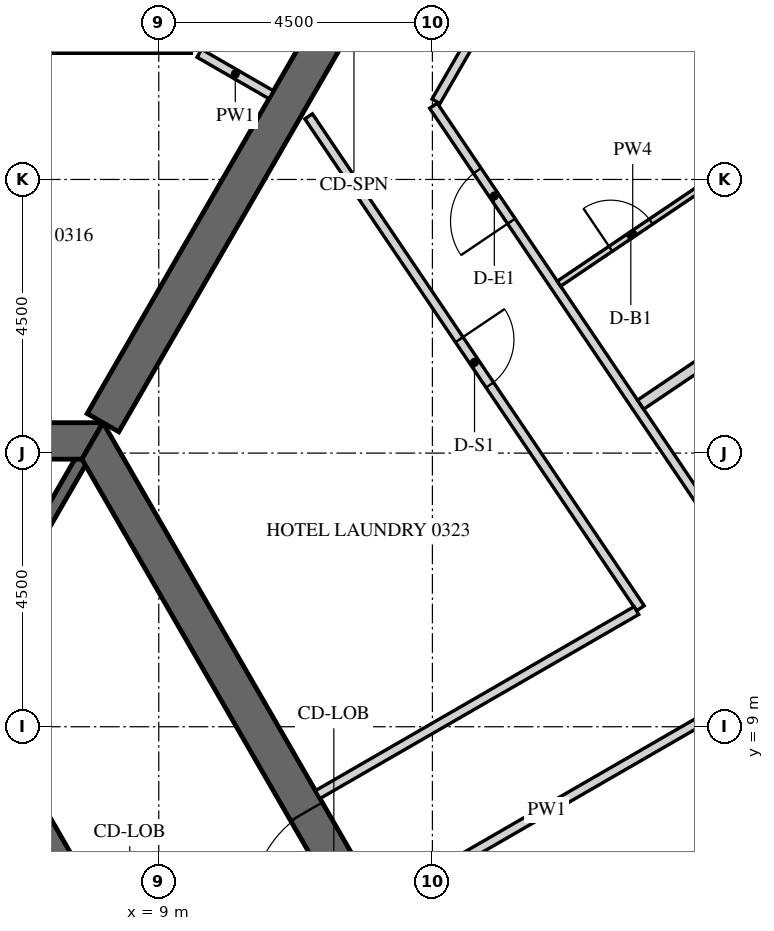
"""IFC4 building model, lengths in metres.
Left out: names, types, materials, properties, quantities, classifications, styles, units other than length and angle.
Written with IfcOpenShell. Run it as: python <this file> out.ifc"""

import sys

from ifc_helpers import new_model, si_unit, direction, frame, frame_2d, origin, place, context, subcontext, project, spatial, polyline, rectangle, outline, extrude, element, fill, save


model = new_model("IFC4")
c1 = context("Model", 3, precision=1e-05, world=origin(), true_north=direction((0.0, 1.0)))
c2 = subcontext(c1, "Body", "Model", "MODEL_VIEW")
j1 = project(units=[si_unit("LENGTHUNIT", "METRE"), si_unit("PLANEANGLEUNIT", "RADIAN")], contexts=[c1])
p1 = place(None, origin())
s1 = spatial("IfcSite", under=j1, at=p1, CompositionType="ELEMENT")
p2 = place(p1, origin())
s2 = spatial("IfcBuilding", under=s1, at=p2, CompositionType="ELEMENT")
p3 = place(p2, frame((0.0, 0.0, 60.9)))
s3 = spatial("IfcBuildingStorey", under=s2, at=p3, CompositionType="ELEMENT", Elevation=60.9)
p4 = place(p3, frame((33.728, 3.153, -0.15), z_axis=(0.0, 0.0, 1.0), x_axis=(-0.559192411416, 0.82903790445, 0.0)))
e1 = element("IfcWall", 1, at=p4, inside=s3, PredefinedType="SOLIDWALL", context=c2, shape_type="SweptSolid", body=[
    extrude(outline(polyline([(-0.026, -0.275), (30.093, -0.275), (30.048, 0.275), (0.026, 0.275), (-0.026, -0.275)])), origin(), (0.0, 0.0, 1.0), 3.9),
])
p5 = place(p4, frame((1.236, 0.0, 1.05)))
e2 = element("IfcOpeningElement", 2, at=p5, cuts=e1, PredefinedType="OPENING", context=c2, shape_type="SweptSolid", body=[
    extrude(rectangle(XDim=2.4, YDim=2.4, at=frame_2d((1.2, 1.2))), frame((0.0, 0.285, 0.0), z_axis=(0.0, -1.0, 0.0), x_axis=(1.0, 0.0, 0.0)), (0.0, 0.0, 1.0), 0.57),
])
p6 = place(p4, frame((4.835, 0.0, 1.05)))
e3 = element("IfcOpeningElement", 3, at=p6, cuts=e1, PredefinedType="OPENING", context=c2, shape_type="SweptSolid", body=[
    extrude(rectangle(XDim=2.4, YDim=2.4, at=frame_2d((1.2, 1.2))), frame((0.0, 0.285, 0.0), z_axis=(0.0, -1.0, 0.0), x_axis=(1.0, 0.0, 0.0)), (0.0, 0.0, 1.0), 0.57),
])
p7 = place(p4, frame((8.436, 0.0, 1.05)))
e4 = element("IfcOpeningElement", 4, at=p7, cuts=e1, PredefinedType="OPENING", context=c2, shape_type="SweptSolid", body=[
    extrude(rectangle(XDim=2.4, YDim=2.4, at=frame_2d((1.2, 1.2))), frame((0.0, 0.285, 0.0), z_axis=(0.0, -1.0, 0.0), x_axis=(1.0, 0.0, 0.0)), (0.0, 0.0, 1.0), 0.57),
])
p8 = place(p4, frame((12.035, 0.0, 1.05)))
e5 = element("IfcOpeningElement", 5, at=p8, cuts=e1, PredefinedType="OPENING", context=c2, shape_type="SweptSolid", body=[
    extrude(rectangle(XDim=2.4, YDim=2.4, at=frame_2d((1.2, 1.2))), frame((0.0, 0.285, 0.0), z_axis=(0.0, -1.0, 0.0), x_axis=(1.0, 0.0, 0.0)), (0.0, 0.0, 1.0), 0.57),
])
p9 = place(p4, frame((15.635, 0.0, 1.05)))
e6 = element("IfcOpeningElement", 6, at=p9, cuts=e1, PredefinedType="OPENING", context=c2, shape_type="SweptSolid", body=[
    extrude(rectangle(XDim=2.4, YDim=2.4, at=frame_2d((1.2, 1.2))), frame((0.0, 0.285, 0.0), z_axis=(0.0, -1.0, 0.0), x_axis=(1.0, 0.0, 0.0)), (0.0, 0.0, 1.0), 0.57),
])
p10 = place(p4, frame((19.236, 0.0, 1.05)))
e7 = element("IfcOpeningElement", 7, at=p10, cuts=e1, PredefinedType="OPENING", context=c2, shape_type="SweptSolid", body=[
    extrude(rectangle(XDim=2.4, YDim=2.4, at=frame_2d((1.2, 1.2))), frame((0.0, 0.285, 0.0), z_axis=(0.0, -1.0, 0.0), x_axis=(1.0, 0.0, 0.0)), (0.0, 0.0, 1.0), 0.57),
])
p11 = place(p4, frame((22.835, 0.0, 1.05)))
e8 = element("IfcOpeningElement", 8, at=p11, cuts=e1, PredefinedType="OPENING", context=c2, shape_type="SweptSolid", body=[
    extrude(rectangle(XDim=2.4, YDim=2.4, at=frame_2d((1.2, 1.2))), frame((0.0, 0.285, 0.0), z_axis=(0.0, -1.0, 0.0), x_axis=(1.0, 0.0, 0.0)), (0.0, 0.0, 1.0), 0.57),
])
p12 = place(p4, frame((26.436, 0.0, 1.05)))
e9 = element("IfcOpeningElement", 9, at=p12, cuts=e1, PredefinedType="OPENING", context=c2, shape_type="SweptSolid", body=[
    extrude(rectangle(XDim=2.4, YDim=2.4, at=frame_2d((1.2, 1.2))), frame((0.0, 0.285, 0.0), z_axis=(0.0, -1.0, 0.0), x_axis=(1.0, 0.0, 0.0)), (0.0, 0.0, 1.0), 0.57),
])
p13 = place(p3, frame((15.819, 0.0, -0.15), z_axis=(0.0, 0.0, 1.0), x_axis=(-0.499999880136, 0.866025472988, 0.0)))
e10 = element("IfcWall", 10, at=p13, inside=s3, PredefinedType="SHEAR", context=c2, shape_type="SweptSolid", body=[
    extrude(outline(polyline([(-0.173, -0.3), (15.993, -0.3), (15.646, 0.3), (0.173, 0.3), (-0.173, -0.3)])), origin(), (0.0, 0.0, 1.0), 3.9),
])
p14 = place(p13, frame((6.981, 0.0, 0.15)))
e11 = element("IfcOpeningElement", 11, at=p14, cuts=e10, PredefinedType="OPENING", context=c2, shape_type="SweptSolid", body=[
    extrude(rectangle(XDim=1.8, YDim=2.4, at=frame_2d((0.9, 1.2))), frame((0.0, 0.31, 0.0), z_axis=(0.0, -1.0, 0.0), x_axis=(1.0, 0.0, 0.0)), (0.0, 0.0, 1.0), 0.62),
])
p15 = place(p3, frame((7.91, 13.7, -0.15), z_axis=(0.0, 0.0, 1.0), x_axis=(-1.0, 0.0, 0.0)))
e12 = element("IfcWall", 12, at=p15, inside=s3, PredefinedType="SHEAR", context=c2, shape_type="SweptSolid", body=[
    extrude(outline(polyline([(-0.173, -0.3), (15.993, -0.3), (15.646, 0.3), (0.173, 0.3), (-0.173, -0.3)])), origin(), (0.0, 0.0, 1.0), 3.9),
])
p16 = place(p15, frame((7.31, 0.0, 0.15)))
e13 = element("IfcOpeningElement", 13, at=p16, cuts=e12, PredefinedType="OPENING", context=c2, shape_type="SweptSolid", body=[
    extrude(rectangle(XDim=1.2, YDim=2.4, at=frame_2d((0.6, 1.2))), frame((0.0, 0.31, 0.0), z_axis=(0.0, -1.0, 0.0), x_axis=(1.0, 0.0, 0.0)), (0.0, 0.0, 1.0), 0.62),
])
p17 = place(p3, frame((8.083, 14.0, -0.15), z_axis=(0.0, 0.0, 1.0), x_axis=(0.499997680643, 0.866026742862, 0.0)))
e14 = element("IfcWall", 14, at=p17, inside=s3, PredefinedType="SHEAR", context=c2, shape_type="SweptSolid", body=[
    extrude(rectangle(XDim=16.509, YDim=0.6, at=frame_2d((8.254, 0.0))), origin(), (0.0, 0.0, 1.0), 3.9),
])
p18 = place(p17, frame((7.354, 0.0, 0.15)))
e15 = element("IfcOpeningElement", 15, at=p18, cuts=e14, PredefinedType="OPENING", context=c2, shape_type="SweptSolid", body=[
    extrude(rectangle(XDim=1.8, YDim=2.4, at=frame_2d((0.9, 1.2))), frame((0.0, 0.31, 0.0), z_axis=(0.0, -1.0, 0.0), x_axis=(1.0, 0.0, 0.0)), (0.0, 0.0, 1.0), 0.62),
])
p19 = place(p3, frame((11.345, 0.0, -0.15), z_axis=(0.0, 0.0, 1.0), x_axis=(-0.499995046907, 0.866028263435, 0.0)))
e16 = element("IfcWall", 16, at=p19, inside=s3, PredefinedType="SHEAR", context=c2, shape_type="SweptSolid", body=[
    extrude(outline(polyline([(-0.101, -0.175), (11.446, -0.175), (11.244, 0.175), (0.101, 0.175), (-0.101, -0.175)])), origin(), (0.0, 0.0, 1.0), 3.9),
])
p20 = place(p19, frame((4.744, 0.0, 0.15)))
e17 = element("IfcOpeningElement", 17, at=p20, cuts=e16, PredefinedType="OPENING", context=c2, shape_type="SweptSolid", body=[
    extrude(rectangle(XDim=1.8, YDim=2.4, at=frame_2d((0.9, 1.2))), frame((0.0, 0.185, 0.0), z_axis=(0.0, -1.0, 0.0), x_axis=(1.0, 0.0, 0.0)), (0.0, 0.0, 1.0), 0.37),
])
p21 = place(p3, frame((5.773, 10.0, -0.15), z_axis=(0.0, 0.0, 1.0), x_axis=(0.500038251005, 0.86600331843, 0.0)))
e18 = element("IfcWall", 18, at=p21, inside=s3, PredefinedType="SHEAR", context=c2, shape_type="SweptSolid", body=[
    extrude(rectangle(XDim=3.926, YDim=0.2, at=frame_2d((1.963, 0.0))), origin(), (0.0, 0.0, 1.0), 3.9),
])
p22 = place(p3, frame((0.825, 20.15, 0.0), z_axis=(0.0, 0.0, 1.0), x_axis=(1.0, 0.0, 0.0)))
e19 = element("IfcWall", 19, at=p22, inside=s3, PredefinedType="PARTITIONING", context=c2, shape_type="SweptSolid", body=[
    extrude(rectangle(XDim=8.712, YDim=0.15, at=frame_2d((4.356, 0.0))), origin(), (0.0, 0.0, 1.0), 2.988),
])
p23 = place(p22, frame((3.906, 0.0, 0.0)))
e20 = element("IfcOpeningElement", 20, at=p23, cuts=e19, PredefinedType="OPENING", context=c2, shape_type="SweptSolid", body=[
    extrude(rectangle(XDim=0.9, YDim=2.1, at=frame_2d((0.45, 1.05))), frame((0.0, 0.085, 0.0), z_axis=(0.0, -1.0, 0.0), x_axis=(1.0, 0.0, 0.0)), (0.0, 0.0, 1.0), 0.17),
])
p24 = place(p3, frame((9.667, 20.075, 0.0), z_axis=(0.0, 0.0, 1.0), x_axis=(0.866000994684, -0.500042275419, 0.0)))
e21 = element("IfcWall", 21, at=p24, inside=s3, PredefinedType="PARTITIONING", context=c2, shape_type="SweptSolid", body=[
    extrude(rectangle(XDim=1.366, YDim=0.15, at=frame_2d((0.683, 0.0))), origin(), (0.0, 0.0, 1.0), 2.988),
])
p25 = place(p3, frame((25.821, 0.972, 0.0), z_axis=(0.0, 0.0, 1.0), x_axis=(-0.559201442833, 0.829031812619, 0.0)))
e22 = element("IfcWall", 22, at=p25, inside=s3, PredefinedType="PARTITIONING", context=c2, shape_type="SweptSolid", body=[
    extrude(rectangle(XDim=22.002, YDim=0.15, at=frame_2d((11.001, 0.0))), origin(), (0.0, 0.0, 1.0), 2.988),
])
p26 = place(p25, frame((0.769, 0.0, 0.0)))
e23 = element("IfcOpeningElement", 23, at=p26, cuts=e22, PredefinedType="OPENING", context=c2, shape_type="SweptSolid", body=[
    extrude(rectangle(XDim=1.0, YDim=2.1, at=frame_2d((0.5, 1.05))), frame((0.0, 0.085, 0.0), z_axis=(0.0, -1.0, 0.0), x_axis=(1.0, 0.0, 0.0)), (0.0, 0.0, 1.0), 0.17),
])
p27 = place(p25, frame((11.421, 0.0, 0.0)))
e24 = element("IfcOpeningElement", 24, at=p27, cuts=e22, PredefinedType="OPENING", context=c2, shape_type="SweptSolid", body=[
    extrude(rectangle(XDim=1.0, YDim=2.1, at=frame_2d((0.5, 1.05))), frame((0.0, 0.085, 0.0), z_axis=(0.0, -1.0, 0.0), x_axis=(1.0, 0.0, 0.0)), (0.0, 0.0, 1.0), 0.17),
])
p28 = place(p25, frame((19.711, 0.0, 0.0)))
e25 = element("IfcOpeningElement", 25, at=p28, cuts=e22, PredefinedType="OPENING", context=c2, shape_type="SweptSolid", body=[
    extrude(rectangle(XDim=1.0, YDim=2.1, at=frame_2d((0.5, 1.05))), frame((0.0, 0.085, 0.0), z_axis=(0.0, -1.0, 0.0), x_axis=(1.0, 0.0, 0.0)), (0.0, 0.0, 1.0), 0.17),
])
p29 = place(p3, frame((13.559, 19.285, 0.0), z_axis=(0.0, 0.0, 1.0), x_axis=(0.499975646431, 0.866039463868, 0.0)))
e26 = element("IfcWall", 26, at=p29, inside=s3, PredefinedType="PARTITIONING", context=c2, shape_type="SweptSolid", body=[
    extrude(rectangle(XDim=3.84, YDim=0.15, at=frame_2d((1.92, 0.0))), origin(), (0.0, 0.0, 1.0), 2.988),
])
p30 = place(p3, frame((12.664, 6.066, 0.0), z_axis=(0.0, 0.0, 1.0), x_axis=(0.866036561919, 0.499980673046, 0.0)))
e27 = element("IfcWall", 27, at=p30, inside=s3, PredefinedType="PARTITIONING", context=c2, shape_type="SweptSolid", body=[
    extrude(rectangle(XDim=6.275, YDim=0.15, at=frame_2d((3.137, 0.0))), origin(), (0.0, 0.0, 1.0), 2.988),
])
p31 = place(p3, frame((11.465, 19.037, 0.0), z_axis=(0.0, 0.0, 1.0), x_axis=(0.559196064773, -0.829035440221, 0.0)))
e28 = element("IfcWall", 28, at=p31, inside=s3, PredefinedType="PARTITIONING", context=c2, shape_type="SweptSolid", body=[
    extrude(rectangle(XDim=9.757, YDim=0.15, at=frame_2d((4.878, 0.0))), origin(), (0.0, 0.0, 1.0), 2.988),
])
p32 = place(p31, frame((4.428, 0.0, 0.0)))
e29 = element("IfcOpeningElement", 29, at=p32, cuts=e28, PredefinedType="OPENING", context=c2, shape_type="SweptSolid", body=[
    extrude(rectangle(XDim=0.9, YDim=2.1, at=frame_2d((0.45, 1.05))), frame((0.0, 0.085, 0.0), z_axis=(0.0, -1.0, 0.0), x_axis=(1.0, 0.0, 0.0)), (0.0, 0.0, 1.0), 0.17),
])
p33 = place(p3, frame((16.855, 10.911, 0.0), z_axis=(0.0, 0.0, 1.0), x_axis=(-0.866020343444, -0.500008764664, 0.0)))
e30 = element("IfcWall", 30, at=p33, inside=s3, PredefinedType="PARTITIONING", context=c2, shape_type="SweptSolid", body=[
    extrude(rectangle(XDim=6.053, YDim=0.15, at=frame_2d((3.026, 0.0))), origin(), (0.0, 0.0, 1.0), 2.988),
])
p34 = place(p3, frame((23.079, 18.449, 0.0), z_axis=(0.0, 0.0, 1.0), x_axis=(-0.829038452737, -0.559191598545, 0.0)))
e31 = element("IfcWall", 31, at=p34, inside=s3, PredefinedType="PARTITIONING", context=c2, shape_type="SweptSolid", body=[
    extrude(rectangle(XDim=7.425, YDim=0.18, at=frame_2d((3.713, 0.0))), origin(), (0.0, 0.0, 1.0), 2.988),
])
p35 = place(p3, frame((15.582, 16.286, 0.0), z_axis=(0.0, 0.0, 1.0), x_axis=(0.829033436212, 0.559199035802, 0.0)))
e32 = element("IfcWall", 32, at=p35, inside=s3, PredefinedType="PARTITIONING", context=c2, shape_type="SweptSolid", body=[
    extrude(rectangle(XDim=2.925, YDim=0.1, at=frame_2d((1.462, 0.0))), origin(), (0.0, 0.0, 1.0), 2.988),
])
p36 = place(p35, frame((1.025, 0.0, 0.0)))
e33 = element("IfcOpeningElement", 33, at=p36, cuts=e32, PredefinedType="OPENING", context=c2, shape_type="SweptSolid", body=[
    extrude(rectangle(XDim=0.8, YDim=2.1, at=frame_2d((0.4, 1.05))), frame((0.0, 0.06, 0.0), z_axis=(0.0, -1.0, 0.0), x_axis=(1.0, 0.0, 0.0)), (0.0, 0.0, 1.0), 0.12),
])
p37 = place(p14, origin())
e34 = element("IfcDoor", 34, at=p37, inside=s3, OperationType="DOUBLE_DOOR_SINGLE_SWING", PredefinedType="DOOR", context=c2, shape_type="SweptSolid", body=[
    extrude(rectangle(XDim=1.8, YDim=2.4, at=frame_2d((0.9, 1.2))), frame((0.0, 0.025, 0.0), z_axis=(0.0, -1.0, 0.0), x_axis=(1.0, 0.0, 0.0)), (0.0, 0.0, 1.0), 0.05),
])
fill(e11, e34)
p38 = place(p28, origin())
e35 = element("IfcDoor", 35, at=p38, inside=s3, OperationType="SINGLE_SWING_RIGHT", PredefinedType="DOOR", context=c2, shape_type="SweptSolid", body=[
    extrude(rectangle(XDim=1.0, YDim=2.1, at=frame_2d((0.5, 1.05))), frame((0.0, 0.025, 0.0), z_axis=(0.0, -1.0, 0.0), x_axis=(1.0, 0.0, 0.0)), (0.0, 0.0, 1.0), 0.05),
])
fill(e25, e35)
p39 = place(p36, origin())
e36 = element("IfcDoor", 36, at=p39, inside=s3, OperationType="SINGLE_SWING_RIGHT", PredefinedType="DOOR", context=c2, shape_type="SweptSolid", body=[
    extrude(rectangle(XDim=0.8, YDim=2.1, at=frame_2d((0.4, 1.05))), frame((0.0, 0.025, 0.0), z_axis=(0.0, -1.0, 0.0), x_axis=(1.0, 0.0, 0.0)), (0.0, 0.0, 1.0), 0.05),
])
fill(e33, e36)
p40 = place(p32, origin())
e37 = element("IfcDoor", 37, at=p40, inside=s3, OperationType="SINGLE_SWING_RIGHT", PredefinedType="DOOR", context=c2, shape_type="SweptSolid", body=[
    extrude(rectangle(XDim=0.9, YDim=2.1, at=frame_2d((0.45, 1.05))), frame((0.0, 0.025, 0.0), z_axis=(0.0, -1.0, 0.0), x_axis=(1.0, 0.0, 0.0)), (0.0, 0.0, 1.0), 0.05),
])
fill(e29, e37)
save(model, sys.argv[1])
